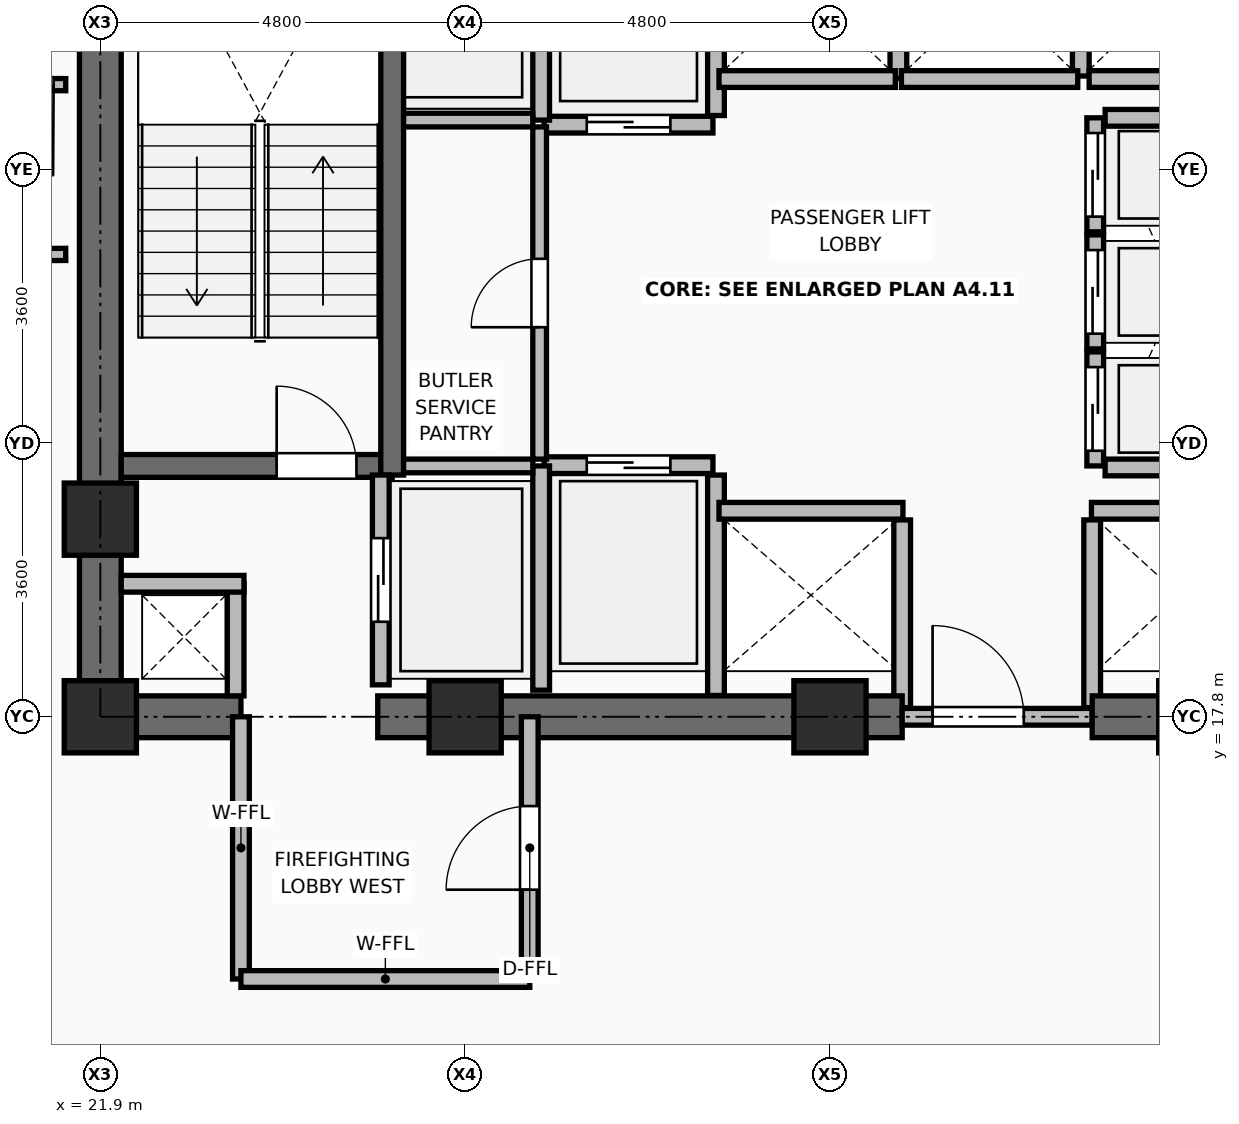
"""IFC4 building model, lengths in metres.
Left out: names, types, materials, properties, quantities, classifications, styles, units other than length and angle.
Written with IfcOpenShell. Run it as: python <this file> out.ifc"""

import sys

from ifc_helpers import new_model, si_unit, direction, frame, frame_2d, origin, origin_2d, place, context, subcontext, project, spatial, rectangle, extrude, element, fill, save


model = new_model("IFC4")
c1 = context("Model", 3, precision=1e-05, world=origin(), true_north=direction((0.0, 1.0)))
c2 = subcontext(c1, "Body", "Model", "MODEL_VIEW")
j1 = project(units=[si_unit("LENGTHUNIT", "METRE"), si_unit("PLANEANGLEUNIT", "RADIAN")], contexts=[c1])
p1 = place(None, origin())
s1 = spatial("IfcSite", under=j1, at=p1, CompositionType="ELEMENT")
p2 = place(p1, origin())
s2 = spatial("IfcBuilding", under=s1, at=p2, CompositionType="ELEMENT")
p3 = place(p2, frame((0.0, 0.0, 160.95)))
s3 = spatial("IfcBuildingStorey", under=s2, at=p3, CompositionType="ELEMENT", Elevation=160.95)
for number, where, z_axis, x_axis in (
    (1, (21.9, 17.8, 0.0), (0.0, 0.0, 1.0), (1.0, 0.0, 0.0)),
    (2, (26.7, 17.8, 0.0), (0.0, 0.0, 1.0), (1.0, 0.0, 0.0)),
    (3, (31.5, 17.8, 0.0), (0.0, 0.0, 1.0), (1.0, 0.0, 0.0)),
    (4, (36.3, 17.8, 0.0), (0.0, 0.0, 1.0), (1.0, 0.0, 0.0)),
    (5, (21.9, 20.4, 0.0), (0.0, 0.0, 1.0), (1.0, 0.0, 0.0)),
):
    element("IfcColumn", number, at=place(p3, frame(where, z_axis=z_axis, x_axis=x_axis)), inside=s3, PredefinedType="COLUMN", context=c2, shape_type="SweptSolid", body=[
        extrude(rectangle(XDim=0.95, YDim=0.95, at=origin_2d()), origin(), (0.0, 0.0, 1.0), 3.75),
    ])
p4 = place(p3, frame((30.0, 18.08, 0.0), z_axis=(0.0, 0.0, 1.0), x_axis=(0.0, 1.0, 0.0)))
e6 = element("IfcWall", 6, at=p4, inside=s3, PredefinedType="PARTITIONING", context=c2, shape_type="SweptSolid", body=[
    extrude(rectangle(XDim=2.9, YDim=0.22, at=frame_2d((1.45, 0.0))), origin(), (0.0, 0.0, 1.0), 3.545),
])
for number, where, z_axis, x_axis in (
    (7, (32.45, 17.92, 0.0), (0.0, 0.0, 1.0), (0.0, 1.0, 0.0)),
    (8, (34.95, 17.92, 0.0), (0.0, 0.0, 1.0), (0.0, 1.0, 0.0)),
):
    element("IfcWall", number, at=place(p3, frame(where, z_axis=z_axis, x_axis=x_axis)), inside=s3, PredefinedType="PARTITIONING", context=c2, shape_type="SweptSolid", body=[
        extrude(rectangle(XDim=2.47, YDim=0.22, at=frame_2d((1.235, 0.0))), origin(), (0.0, 0.0, 1.0), 3.006),
    ])
p5 = place(p3, frame((30.0, 25.71, 0.0), z_axis=(0.0, 0.0, 1.0), x_axis=(0.0, 1.0, 0.0)))
e9 = element("IfcWall", 9, at=p5, inside=s3, PredefinedType="PARTITIONING", context=c2, shape_type="SweptSolid", body=[
    extrude(rectangle(XDim=2.73, YDim=0.22, at=frame_2d((1.365, 0.0))), origin(), (0.0, 0.0, 1.0), 3.545),
])
p6 = place(p3, frame((32.4, 26.2, 0.0), z_axis=(0.0, 0.0, 1.0), x_axis=(0.0, 1.0, 0.0)))
e10 = element("IfcWall", 10, at=p6, inside=s3, PredefinedType="PARTITIONING", context=c2, shape_type="SweptSolid", body=[
    extrude(rectangle(XDim=2.24, YDim=0.22, at=frame_2d((1.12, 0.0))), origin(), (0.0, 0.0, 1.0), 3.545),
])
p7 = place(p3, frame((34.8, 26.23, 0.0), z_axis=(0.0, 0.0, 1.0), x_axis=(0.0, 1.0, 0.0)))
e11 = element("IfcWall", 11, at=p7, inside=s3, PredefinedType="PARTITIONING", context=c2, shape_type="SweptSolid", body=[
    extrude(rectangle(XDim=2.21, YDim=0.22, at=frame_2d((1.105, 0.0))), origin(), (0.0, 0.0, 1.0), 3.545),
])
p8 = place(p3, frame((34.91, 26.19, 0.0), z_axis=(0.0, 0.0, 1.0), x_axis=(1.0, 0.0, 0.0)))
e12 = element("IfcWall", 12, at=p8, inside=s3, PredefinedType="PARTITIONING", context=c2, shape_type="SweptSolid", body=[
    extrude(rectangle(XDim=2.14, YDim=0.22, at=frame_2d((1.07, 0.0))), origin(), (0.0, 0.0, 1.0), 3.545),
])
p9 = place(p3, frame((21.625, 17.8, 0.0), z_axis=(0.0, 0.0, 1.0), x_axis=(1.0, 0.0, 0.0)))
e13 = element("IfcWall", 13, at=p9, inside=s3, PredefinedType="SHEAR", context=c2, shape_type="SweptSolid", body=[
    extrude(rectangle(XDim=2.125, YDim=0.55, at=frame_2d((1.062, 0.0))), origin(), (0.0, 0.0, 1.0), 3.57),
])
p10 = place(p3, frame((25.55, 17.8, 0.0), z_axis=(0.0, 0.0, 1.0), x_axis=(1.0, 0.0, 0.0)))
e14 = element("IfcWall", 14, at=p10, inside=s3, PredefinedType="SHEAR", context=c2, shape_type="SweptSolid", body=[
    extrude(rectangle(XDim=6.9, YDim=0.55, at=frame_2d((3.45, 0.0))), origin(), (0.0, 0.0, 1.0), 3.57),
])
p11 = place(p3, frame((32.45, 17.8, 0.0), z_axis=(0.0, 0.0, 1.0), x_axis=(1.0, 0.0, 0.0)))
e15 = element("IfcWall", 15, at=p11, inside=s3, PredefinedType="PARTITIONING", context=c2, shape_type="SweptSolid", body=[
    extrude(rectangle(XDim=2.5, YDim=0.22, at=frame_2d((1.25, 0.0))), origin(), (0.0, 0.0, 1.0), 3.006),
])
p12 = place(p11, frame((0.4, 0.0, 0.0)))
e16 = element("IfcOpeningElement", 16, at=p12, cuts=e15, PredefinedType="OPENING", context=c2, shape_type="SweptSolid", body=[
    extrude(rectangle(XDim=1.2, YDim=2.1, at=frame_2d((0.6, 1.05))), frame((0.0, 0.12, 0.0), z_axis=(0.0, -1.0, 0.0), x_axis=(1.0, 0.0, 0.0)), (0.0, 0.0, 1.0), 0.24),
])
p13 = place(p3, frame((34.95, 17.8, 0.0), z_axis=(0.0, 0.0, 1.0), x_axis=(1.0, 0.0, 0.0)))
e17 = element("IfcWall", 17, at=p13, inside=s3, PredefinedType="SHEAR", context=c2, shape_type="SweptSolid", body=[
    extrude(rectangle(XDim=6.425, YDim=0.55, at=frame_2d((3.212, 0.0))), origin(), (0.0, 0.0, 1.0), 3.57),
])
p14 = place(p3, frame((21.9, 18.075, 0.0), z_axis=(0.0, 0.0, 1.0), x_axis=(0.0, 1.0, 0.0)))
e18 = element("IfcWall", 18, at=p14, inside=s3, PredefinedType="SHEAR", context=c2, shape_type="SweptSolid", body=[
    extrude(rectangle(XDim=14.1, YDim=0.55, at=frame_2d((7.05, 0.0))), origin(), (0.0, 0.0, 1.0), 3.57),
])
p15 = place(p3, frame((22.175, 21.1, 0.0), z_axis=(0.0, 0.0, 1.0), x_axis=(1.0, 0.0, 0.0)))
e19 = element("IfcWall", 19, at=p15, inside=s3, PredefinedType="SHEAR", context=c2, shape_type="SweptSolid", body=[
    extrude(rectangle(XDim=3.565, YDim=0.3, at=frame_2d((1.782, 0.0))), origin(), (0.0, 0.0, 1.0), 3.57),
])
p16 = place(p15, frame((2.045, 0.0, 0.0)))
e20 = element("IfcOpeningElement", 20, at=p16, cuts=e19, PredefinedType="OPENING", context=c2, shape_type="SweptSolid", body=[
    extrude(rectangle(XDim=1.05, YDim=2.1, at=frame_2d((0.525, 1.05))), frame((0.0, 0.16, 0.0), z_axis=(0.0, -1.0, 0.0), x_axis=(1.0, 0.0, 0.0)), (0.0, 0.0, 1.0), 0.32),
])
p17 = place(p3, frame((25.74, 20.98, 0.0), z_axis=(0.0, 0.0, 1.0), x_axis=(0.0, 1.0, 0.0)))
e21 = element("IfcWall", 21, at=p17, inside=s3, PredefinedType="SHEAR", context=c2, shape_type="SweptSolid", body=[
    extrude(rectangle(XDim=7.99, YDim=0.3, at=frame_2d((3.995, 0.0))), origin(), (0.0, 0.0, 1.0), 3.57),
])
p18 = place(p3, frame((23.68, 18.075, 0.0), z_axis=(0.0, 0.0, 1.0), x_axis=(0.0, 1.0, 0.0)))
e22 = element("IfcWall", 22, at=p18, inside=s3, PredefinedType="PARTITIONING", context=c2, shape_type="SweptSolid", body=[
    extrude(rectangle(XDim=1.475, YDim=0.22, at=frame_2d((0.738, 0.0))), origin(), (0.0, 0.0, 1.0), 3.55),
])
p19 = place(p3, frame((22.175, 19.55, 0.0), z_axis=(0.0, 0.0, 1.0), x_axis=(1.0, 0.0, 0.0)))
e23 = element("IfcWall", 23, at=p19, inside=s3, PredefinedType="PARTITIONING", context=c2, shape_type="SweptSolid", body=[
    extrude(rectangle(XDim=1.615, YDim=0.22, at=frame_2d((0.808, 0.0))), origin(), (0.0, 0.0, 1.0), 2.595),
])
p20 = place(p3, frame((25.59, 18.22, 0.0), z_axis=(0.0, 0.0, 1.0), x_axis=(0.0, 1.0, 0.0)))
e24 = element("IfcWall", 24, at=p20, inside=s3, PredefinedType="PARTITIONING", context=c2, shape_type="SweptSolid", body=[
    extrude(rectangle(XDim=2.76, YDim=0.22, at=frame_2d((1.38, 0.0))), origin(), (0.0, 0.0, 1.0), 3.55),
])
p21 = place(p20, frame((0.83, 0.0, 0.0)))
e25 = element("IfcOpeningElement", 25, at=p21, cuts=e24, PredefinedType="OPENING", context=c2, shape_type="SweptSolid", body=[
    extrude(rectangle(XDim=1.1, YDim=2.2, at=frame_2d((0.55, 1.1))), frame((0.0, 0.12, 0.0), z_axis=(0.0, -1.0, 0.0), x_axis=(1.0, 0.0, 0.0)), (0.0, 0.0, 1.0), 0.24),
])
p22 = place(p3, frame((27.74, 21.11, 0.0), z_axis=(0.0, 0.0, 1.0), x_axis=(1.0, 0.0, 0.0)))
e26 = element("IfcWall", 26, at=p22, inside=s3, PredefinedType="PARTITIONING", context=c2, shape_type="SweptSolid", body=[
    extrude(rectangle(XDim=2.22, YDim=0.22, at=frame_2d((1.11, 0.0))), origin(), (0.0, 0.0, 1.0), 3.55),
])
p23 = place(p22, frame((0.56, 0.0, 0.0)))
e27 = element("IfcOpeningElement", 27, at=p23, cuts=e26, PredefinedType="OPENING", context=c2, shape_type="SweptSolid", body=[
    extrude(rectangle(XDim=1.1, YDim=2.2, at=frame_2d((0.55, 1.1))), frame((0.0, 0.12, 0.0), z_axis=(0.0, -1.0, 0.0), x_axis=(1.0, 0.0, 0.0)), (0.0, 0.0, 1.0), 0.24),
])
p24 = place(p3, frame((27.74, 25.59, 0.0), z_axis=(0.0, 0.0, 1.0), x_axis=(1.0, 0.0, 0.0)))
e28 = element("IfcWall", 28, at=p24, inside=s3, PredefinedType="PARTITIONING", context=c2, shape_type="SweptSolid", body=[
    extrude(rectangle(XDim=2.22, YDim=0.22, at=frame_2d((1.11, 0.0))), origin(), (0.0, 0.0, 1.0), 3.55),
])
p25 = place(p24, frame((0.56, 0.0, 0.0)))
e29 = element("IfcOpeningElement", 29, at=p25, cuts=e28, PredefinedType="OPENING", context=c2, shape_type="SweptSolid", body=[
    extrude(rectangle(XDim=1.1, YDim=2.2, at=frame_2d((0.55, 1.1))), frame((0.0, 0.12, 0.0), z_axis=(0.0, -1.0, 0.0), x_axis=(1.0, 0.0, 0.0)), (0.0, 0.0, 1.0), 0.24),
])
p26 = place(p3, frame((30.04, 20.51, 0.0), z_axis=(0.0, 0.0, 1.0), x_axis=(1.0, 0.0, 0.0)))
e30 = element("IfcWall", 30, at=p26, inside=s3, PredefinedType="PARTITIONING", context=c2, shape_type="SweptSolid", body=[
    extrude(rectangle(XDim=2.42, YDim=0.22, at=frame_2d((1.21, 0.0))), origin(), (0.0, 0.0, 1.0), 3.55),
])
p27 = place(p3, frame((34.94, 20.51, 0.0), z_axis=(0.0, 0.0, 1.0), x_axis=(1.0, 0.0, 0.0)))
e31 = element("IfcWall", 31, at=p27, inside=s3, PredefinedType="PARTITIONING", context=c2, shape_type="SweptSolid", body=[
    extrude(rectangle(XDim=2.24, YDim=0.22, at=frame_2d((1.12, 0.0))), origin(), (0.0, 0.0, 1.0), 3.55),
])
for number, where, z_axis, x_axis in (
    (32, (30.04, 26.19, 0.0), (0.0, 0.0, 1.0), (1.0, 0.0, 0.0)),
    (33, (32.44, 26.19, 0.0), (0.0, 0.0, 1.0), (1.0, 0.0, 0.0)),
):
    element("IfcWall", number, at=place(p3, frame(where, z_axis=z_axis, x_axis=x_axis)), inside=s3, PredefinedType="PARTITIONING", context=c2, shape_type="SweptSolid", body=[
        extrude(rectangle(XDim=2.32, YDim=0.22, at=frame_2d((1.16, 0.0))), origin(), (0.0, 0.0, 1.0), 3.55),
    ])
p28 = place(p3, frame((34.99, 21.1, 0.0), z_axis=(0.0, 0.0, 1.0), x_axis=(0.0, 1.0, 0.0)))
e34 = element("IfcWall", 34, at=p28, inside=s3, PredefinedType="PARTITIONING", context=c2, shape_type="SweptSolid", body=[
    extrude(rectangle(XDim=1.5, YDim=0.22, at=frame_2d((0.75, 0.0))), origin(), (0.0, 0.0, 1.0), 3.55),
])
p29 = place(p28, frame((0.2, 0.0, 0.0)))
e35 = element("IfcOpeningElement", 35, at=p29, cuts=e34, PredefinedType="OPENING", context=c2, shape_type="SweptSolid", body=[
    extrude(rectangle(XDim=1.1, YDim=2.2, at=frame_2d((0.55, 1.1))), frame((0.0, 0.12, 0.0), z_axis=(0.0, -1.0, 0.0), x_axis=(1.0, 0.0, 0.0)), (0.0, 0.0, 1.0), 0.24),
])
p30 = place(p3, frame((34.99, 22.64, 0.0), z_axis=(0.0, 0.0, 1.0), x_axis=(0.0, 1.0, 0.0)))
e36 = element("IfcWall", 36, at=p30, inside=s3, PredefinedType="PARTITIONING", context=c2, shape_type="SweptSolid", body=[
    extrude(rectangle(XDim=1.5, YDim=0.22, at=frame_2d((0.75, 0.0))), origin(), (0.0, 0.0, 1.0), 3.55),
])
p31 = place(p30, frame((0.2, 0.0, 0.0)))
e37 = element("IfcOpeningElement", 37, at=p31, cuts=e36, PredefinedType="OPENING", context=c2, shape_type="SweptSolid", body=[
    extrude(rectangle(XDim=1.1, YDim=2.2, at=frame_2d((0.55, 1.1))), frame((0.0, 0.12, 0.0), z_axis=(0.0, -1.0, 0.0), x_axis=(1.0, 0.0, 0.0)), (0.0, 0.0, 1.0), 0.24),
])
p32 = place(p3, frame((34.99, 24.18, 0.0), z_axis=(0.0, 0.0, 1.0), x_axis=(0.0, 1.0, 0.0)))
e38 = element("IfcWall", 38, at=p32, inside=s3, PredefinedType="PARTITIONING", context=c2, shape_type="SweptSolid", body=[
    extrude(rectangle(XDim=1.5, YDim=0.22, at=frame_2d((0.75, 0.0))), origin(), (0.0, 0.0, 1.0), 3.55),
])
p33 = place(p32, frame((0.2, 0.0, 0.0)))
e39 = element("IfcOpeningElement", 39, at=p33, cuts=e38, PredefinedType="OPENING", context=c2, shape_type="SweptSolid", body=[
    extrude(rectangle(XDim=1.1, YDim=2.2, at=frame_2d((0.55, 1.1))), frame((0.0, 0.12, 0.0), z_axis=(0.0, -1.0, 0.0), x_axis=(1.0, 0.0, 0.0)), (0.0, 0.0, 1.0), 0.24),
])
p34 = place(p3, frame((27.7, 18.15, 0.0), z_axis=(0.0, 0.0, 1.0), x_axis=(0.0, 1.0, 0.0)))
e40 = element("IfcWall", 40, at=p34, inside=s3, PredefinedType="PARTITIONING", context=c2, shape_type="SweptSolid", body=[
    extrude(rectangle(XDim=2.95, YDim=0.22, at=frame_2d((1.475, 0.0))), origin(), (0.0, 0.0, 1.0), 3.55),
])
p35 = place(p3, frame((27.7, 25.65, 0.0), z_axis=(0.0, 0.0, 1.0), x_axis=(0.0, 1.0, 0.0)))
e41 = element("IfcWall", 41, at=p35, inside=s3, PredefinedType="PARTITIONING", context=c2, shape_type="SweptSolid", body=[
    extrude(rectangle(XDim=3.0, YDim=0.22, at=frame_2d((1.5, 0.0))), origin(), (0.0, 0.0, 1.0), 3.55),
])
for number, where, z_axis, x_axis in (
    (42, (35.12, 21.08, 0.0), (0.0, 0.0, 1.0), (1.0, 0.0, 0.0)),
    (43, (35.12, 25.68, 0.0), (0.0, 0.0, 1.0), (1.0, 0.0, 0.0)),
):
    element("IfcWall", number, at=place(p3, frame(where, z_axis=z_axis, x_axis=x_axis)), inside=s3, PredefinedType="PARTITIONING", context=c2, shape_type="SweptSolid", body=[
        extrude(rectangle(XDim=1.94, YDim=0.22, at=frame_2d((0.97, 0.0))), origin(), (0.0, 0.0, 1.0), 3.55),
    ])
for number, where, z_axis, x_axis in (
    (44, (25.89, 21.1, 0.0), (0.0, 0.0, 1.0), (1.0, 0.0, 0.0)),
    (45, (25.89, 25.65, 0.0), (0.0, 0.0, 1.0), (1.0, 0.0, 0.0)),
):
    element("IfcWall", number, at=place(p3, frame(where, z_axis=z_axis, x_axis=x_axis)), inside=s3, PredefinedType="PARTITIONING", context=c2, shape_type="SweptSolid", body=[
        extrude(rectangle(XDim=1.7, YDim=0.18, at=frame_2d((0.85, 0.0))), origin(), (0.0, 0.0, 1.0), 3.55),
    ])
p36 = place(p3, frame((27.68, 21.19, 0.0), z_axis=(0.0, 0.0, 1.0), x_axis=(0.0, 1.0, 0.0)))
e46 = element("IfcWall", 46, at=p36, inside=s3, PredefinedType="PARTITIONING", context=c2, shape_type="SweptSolid", body=[
    extrude(rectangle(XDim=4.37, YDim=0.18, at=frame_2d((2.185, 0.0))), origin(), (0.0, 0.0, 1.0), 3.55),
])
p37 = place(p36, frame((1.735, 0.0, 0.0)))
e47 = element("IfcOpeningElement", 47, at=p37, cuts=e46, PredefinedType="OPENING", context=c2, shape_type="SweptSolid", body=[
    extrude(rectangle(XDim=0.9, YDim=2.1, at=frame_2d((0.45, 1.05))), frame((0.0, 0.1, 0.0), z_axis=(0.0, -1.0, 0.0), x_axis=(1.0, 0.0, 0.0)), (0.0, 0.0, 1.0), 0.2),
])
p38 = place(p3, frame((23.75, 14.35, 0.0), z_axis=(0.0, 0.0, 1.0), x_axis=(0.0, 1.0, 0.0)))
e48 = element("IfcWall", 48, at=p38, inside=s3, PredefinedType="PARTITIONING", context=c2, shape_type="SweptSolid", body=[
    extrude(rectangle(XDim=3.45, YDim=0.22, at=frame_2d((1.725, 0.0))), origin(), (0.0, 0.0, 1.0), 3.006),
])
p39 = place(p3, frame((23.75, 14.35, 0.0), z_axis=(0.0, 0.0, 1.0), x_axis=(1.0, 0.0, 0.0)))
e49 = element("IfcWall", 49, at=p39, inside=s3, PredefinedType="PARTITIONING", context=c2, shape_type="SweptSolid", body=[
    extrude(rectangle(XDim=3.8, YDim=0.22, at=frame_2d((1.9, 0.0))), origin(), (0.0, 0.0, 1.0), 3.55),
])
p40 = place(p3, frame((27.55, 14.35, 0.0), z_axis=(0.0, 0.0, 1.0), x_axis=(0.0, 1.0, 0.0)))
e50 = element("IfcWall", 50, at=p40, inside=s3, PredefinedType="PARTITIONING", context=c2, shape_type="SweptSolid", body=[
    extrude(rectangle(XDim=3.45, YDim=0.22, at=frame_2d((1.725, 0.0))), origin(), (0.0, 0.0, 1.0), 3.006),
])
p41 = place(p40, frame((1.175, 0.0, 0.0)))
e51 = element("IfcOpeningElement", 51, at=p41, cuts=e50, PredefinedType="OPENING", context=c2, shape_type="SweptSolid", body=[
    extrude(rectangle(XDim=1.1, YDim=2.1, at=frame_2d((0.55, 1.05))), frame((0.0, 0.12, 0.0), z_axis=(0.0, -1.0, 0.0), x_axis=(1.0, 0.0, 0.0)), (0.0, 0.0, 1.0), 0.24),
])
p42 = place(p3, frame((21.445, 26.116, 0.0), z_axis=(0.0, 0.0, 1.0), x_axis=(-0.999984646479, 0.005541372271, 0.0)))
e52 = element("IfcWall", 52, at=p42, inside=s3, PredefinedType="PARTITIONING", context=c2, shape_type="SweptSolid", body=[
    extrude(rectangle(XDim=4.714, YDim=0.16, at=frame_2d((2.357, 0.0))), origin(), (0.0, 0.0, 1.0), 2.595),
])
p43 = place(p42, frame((0.16, 0.0, 0.0)))
e53 = element("IfcOpeningElement", 53, at=p43, cuts=e52, PredefinedType="OPENING", context=c2, shape_type="SweptSolid", body=[
    extrude(rectangle(XDim=1.2, YDim=2.1, at=frame_2d((0.6, 1.05))), frame((0.0, 0.09, 0.0), z_axis=(0.0, -1.0, 0.0), x_axis=(1.0, 0.0, 0.0)), (0.0, 0.0, 1.0), 0.18),
])
p44 = place(p3, frame((16.73, 23.854, 0.0), z_axis=(0.0, 0.0, 1.0), x_axis=(0.999981017558, 0.00616153581, 0.0)))
e54 = element("IfcWall", 54, at=p44, inside=s3, PredefinedType="PARTITIONING", context=c2, shape_type="SweptSolid", body=[
    extrude(rectangle(XDim=4.715, YDim=0.16, at=frame_2d((2.357, 0.0))), origin(), (0.0, 0.0, 1.0), 2.595),
])
p45 = place(p12, origin())
e55 = element("IfcDoor", 55, at=p45, inside=s3, OperationType="SINGLE_SWING_LEFT", PredefinedType="DOOR", context=c2, shape_type="SweptSolid", body=[
    extrude(rectangle(XDim=1.2, YDim=2.1, at=frame_2d((0.6, 1.05))), frame((0.0, 0.025, 0.0), z_axis=(0.0, -1.0, 0.0), x_axis=(1.0, 0.0, 0.0)), (0.0, 0.0, 1.0), 0.05),
])
fill(e16, e55)
p46 = place(p16, origin())
e56 = element("IfcDoor", 56, at=p46, inside=s3, OperationType="SINGLE_SWING_LEFT", PredefinedType="DOOR", context=c2, shape_type="SweptSolid", body=[
    extrude(rectangle(XDim=1.05, YDim=2.1, at=frame_2d((0.525, 1.05))), frame((0.0, 0.025, 0.0), z_axis=(0.0, -1.0, 0.0), x_axis=(1.0, 0.0, 0.0)), (0.0, 0.0, 1.0), 0.05),
])
fill(e20, e56)
p47 = place(p21, origin())
e57 = element("IfcDoor", 57, at=p47, inside=s3, OperationType="DOUBLE_DOOR_SLIDING", PredefinedType="DOOR", context=c2, shape_type="SweptSolid", body=[
    extrude(rectangle(XDim=1.1, YDim=2.2, at=frame_2d((0.55, 1.1))), frame((0.0, 0.025, 0.0), z_axis=(0.0, -1.0, 0.0), x_axis=(1.0, 0.0, 0.0)), (0.0, 0.0, 1.0), 0.05),
])
fill(e25, e57)
p48 = place(p23, origin())
e58 = element("IfcDoor", 58, at=p48, inside=s3, OperationType="DOUBLE_DOOR_SLIDING", PredefinedType="DOOR", context=c2, shape_type="SweptSolid", body=[
    extrude(rectangle(XDim=1.1, YDim=2.2, at=frame_2d((0.55, 1.1))), frame((0.0, 0.025, 0.0), z_axis=(0.0, -1.0, 0.0), x_axis=(1.0, 0.0, 0.0)), (0.0, 0.0, 1.0), 0.05),
])
fill(e27, e58)
p49 = place(p25, frame((1.1, 0.0, 0.0), z_axis=(0.0, 0.0, 1.0), x_axis=(-1.0, 0.0, 0.0)))
e59 = element("IfcDoor", 59, at=p49, inside=s3, OperationType="DOUBLE_DOOR_SLIDING", PredefinedType="DOOR", context=c2, shape_type="SweptSolid", body=[
    extrude(rectangle(XDim=1.1, YDim=2.2, at=frame_2d((0.55, 1.1))), frame((0.0, 0.025, 0.0), z_axis=(0.0, -1.0, 0.0), x_axis=(1.0, 0.0, 0.0)), (0.0, 0.0, 1.0), 0.05),
])
fill(e29, e59)
p50 = place(p29, origin())
e60 = element("IfcDoor", 60, at=p50, inside=s3, OperationType="DOUBLE_DOOR_SLIDING", PredefinedType="DOOR", context=c2, shape_type="SweptSolid", body=[
    extrude(rectangle(XDim=1.1, YDim=2.2, at=frame_2d((0.55, 1.1))), frame((0.0, 0.025, 0.0), z_axis=(0.0, -1.0, 0.0), x_axis=(1.0, 0.0, 0.0)), (0.0, 0.0, 1.0), 0.05),
])
fill(e35, e60)
p51 = place(p31, origin())
e61 = element("IfcDoor", 61, at=p51, inside=s3, OperationType="DOUBLE_DOOR_SLIDING", PredefinedType="DOOR", context=c2, shape_type="SweptSolid", body=[
    extrude(rectangle(XDim=1.1, YDim=2.2, at=frame_2d((0.55, 1.1))), frame((0.0, 0.025, 0.0), z_axis=(0.0, -1.0, 0.0), x_axis=(1.0, 0.0, 0.0)), (0.0, 0.0, 1.0), 0.05),
])
fill(e37, e61)
p52 = place(p33, origin())
e62 = element("IfcDoor", 62, at=p52, inside=s3, OperationType="DOUBLE_DOOR_SLIDING", PredefinedType="DOOR", context=c2, shape_type="SweptSolid", body=[
    extrude(rectangle(XDim=1.1, YDim=2.2, at=frame_2d((0.55, 1.1))), frame((0.0, 0.025, 0.0), z_axis=(0.0, -1.0, 0.0), x_axis=(1.0, 0.0, 0.0)), (0.0, 0.0, 1.0), 0.05),
])
fill(e39, e62)
p53 = place(p37, origin())
e63 = element("IfcDoor", 63, at=p53, inside=s3, OperationType="SINGLE_SWING_LEFT", PredefinedType="DOOR", context=c2, shape_type="SweptSolid", body=[
    extrude(rectangle(XDim=0.9, YDim=2.1, at=frame_2d((0.45, 1.05))), frame((0.0, 0.025, 0.0), z_axis=(0.0, -1.0, 0.0), x_axis=(1.0, 0.0, 0.0)), (0.0, 0.0, 1.0), 0.05),
])
fill(e47, e63)
p54 = place(p41, origin())
e64 = element("IfcDoor", 64, at=p54, inside=s3, OperationType="SINGLE_SWING_LEFT", PredefinedType="DOOR", context=c2, shape_type="SweptSolid", body=[
    extrude(rectangle(XDim=1.1, YDim=2.1, at=frame_2d((0.55, 1.05))), frame((0.0, 0.025, 0.0), z_axis=(0.0, -1.0, 0.0), x_axis=(1.0, 0.0, 0.0)), (0.0, 0.0, 1.0), 0.05),
])
fill(e51, e64)
p55 = place(p43, origin())
e65 = element("IfcDoor", 65, at=p55, inside=s3, OperationType="SINGLE_SWING_LEFT", PredefinedType="DOOR", context=c2, shape_type="SweptSolid", body=[
    extrude(rectangle(XDim=1.2, YDim=2.1, at=frame_2d((0.6, 1.05))), frame((0.0, 0.025, 0.0), z_axis=(0.0, -1.0, 0.0), x_axis=(1.0, 0.0, 0.0)), (0.0, 0.0, 1.0), 0.05),
])
fill(e53, e65)
save(model, sys.argv[1])
